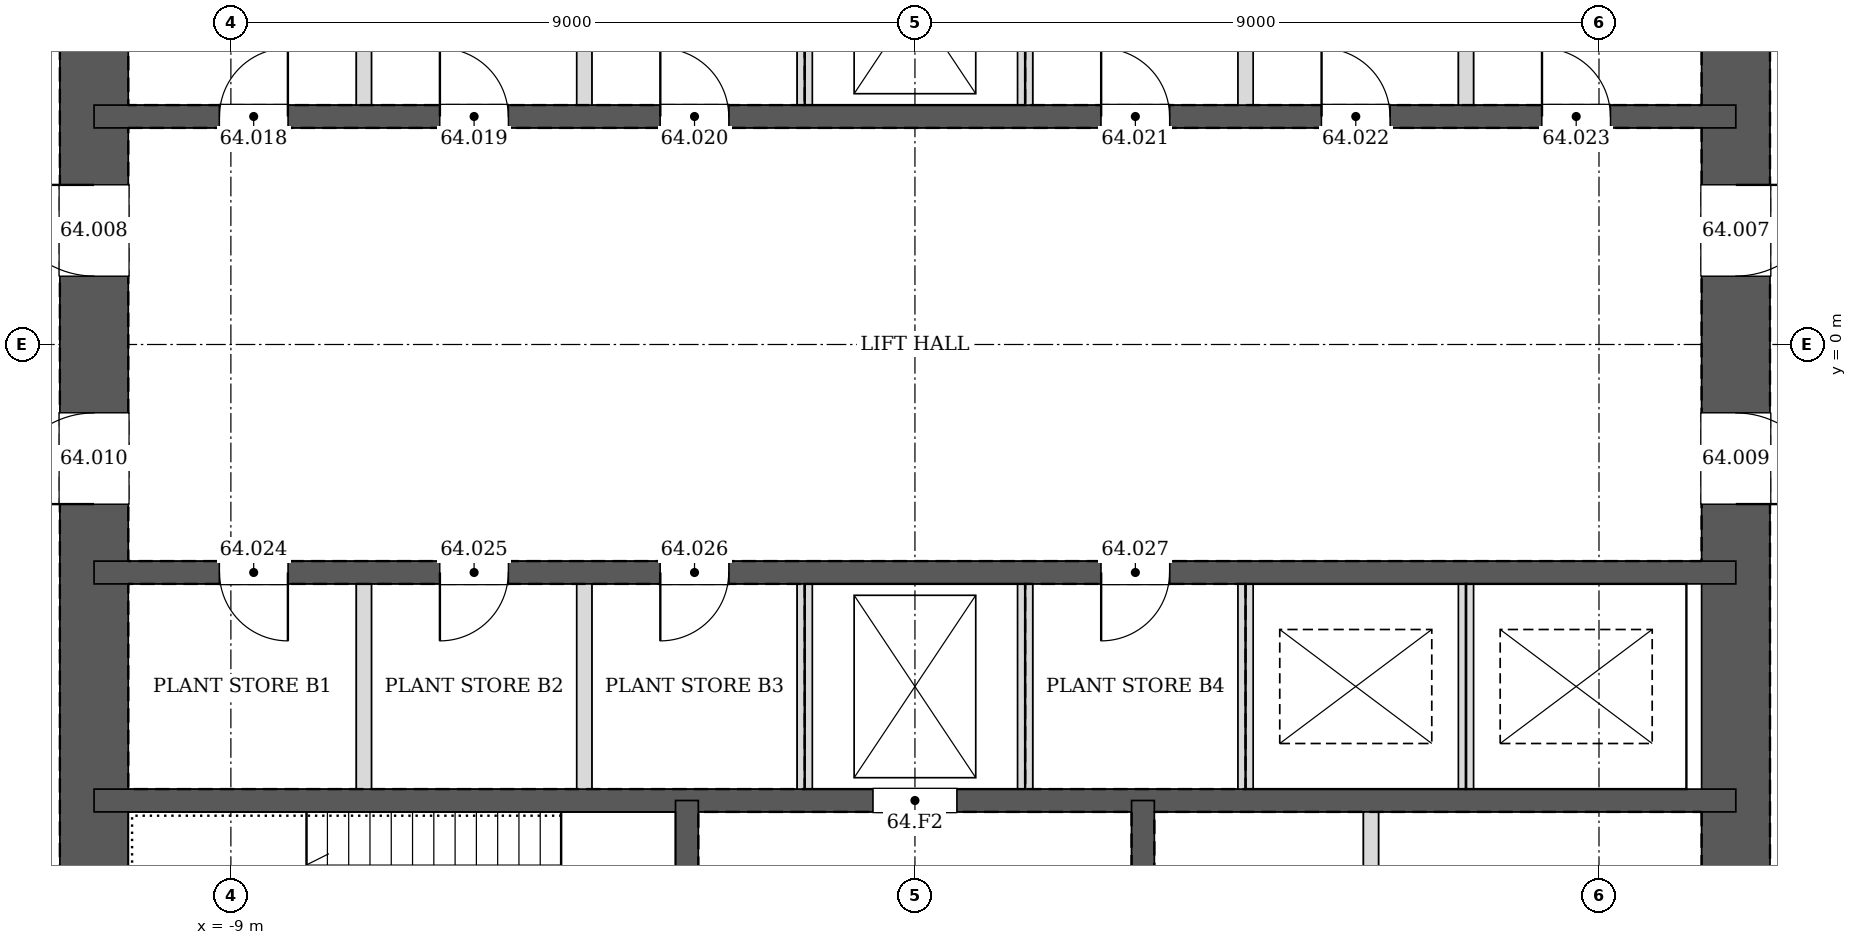
"""IFC4 building model, lengths in metres.
Left out: names, types, materials, properties, quantities, classifications, styles, units other than length and angle.
Written with IfcOpenShell. Run it as: python <this file> out.ifc"""

import sys

from ifc_helpers import new_model, si_unit, direction, frame, frame_2d, origin, place, context, subcontext, project, spatial, rectangle, extrude, element, fill, save


model = new_model("IFC4")
c1 = context("Model", 3, precision=1e-05, world=origin(), true_north=direction((0.0, 1.0)))
c2 = subcontext(c1, "Body", "Model", "MODEL_VIEW")
j1 = project(units=[si_unit("LENGTHUNIT", "METRE"), si_unit("PLANEANGLEUNIT", "RADIAN")], contexts=[c1])
p1 = place(None, origin())
s1 = spatial("IfcSite", under=j1, at=p1, CompositionType="ELEMENT")
p2 = place(p1, origin())
s2 = spatial("IfcBuilding", under=s1, at=p2, CompositionType="ELEMENT")
p3 = place(p2, frame((0.0, 0.0, 266.3)))
s3 = spatial("IfcBuildingStorey", under=s2, at=p3, CompositionType="ELEMENT", Elevation=266.3)
p4 = place(p3, frame((10.8, -10.8, 0.0), z_axis=(0.0, 0.0, 1.0), x_axis=(0.0, 1.0, 0.0)))
e1 = element("IfcWall", 1, at=p4, inside=s3, PredefinedType="SOLIDWALL", context=c2, shape_type="SweptSolid", body=[
    extrude(rectangle(XDim=21.6, YDim=0.9, at=frame_2d((10.8, 0.0))), origin(), (0.0, 0.0, 1.0), 4.5),
])
p5 = place(p4, frame((11.7, 0.0, 0.0)))
e2 = element("IfcOpeningElement", 2, at=p5, cuts=e1, PredefinedType="OPENING", context=c2, shape_type="SweptSolid", body=[
    extrude(rectangle(XDim=1.2, YDim=2.1, at=frame_2d((0.6, 1.05))), frame((0.0, 0.46, 0.0), z_axis=(0.0, -1.0, 0.0), x_axis=(1.0, 0.0, 0.0)), (0.0, 0.0, 1.0), 0.92),
])
p6 = place(p4, frame((8.7, 0.0, 0.0)))
e3 = element("IfcOpeningElement", 3, at=p6, cuts=e1, PredefinedType="OPENING", context=c2, shape_type="SweptSolid", body=[
    extrude(rectangle(XDim=1.2, YDim=2.1, at=frame_2d((0.6, 1.05))), frame((0.0, 0.46, 0.0), z_axis=(0.0, -1.0, 0.0), x_axis=(1.0, 0.0, 0.0)), (0.0, 0.0, 1.0), 0.92),
])
p7 = place(p3, frame((-10.8, 10.8, 0.0), z_axis=(0.0, 0.0, 1.0), x_axis=(0.0, -1.0, 0.0)))
e4 = element("IfcWall", 4, at=p7, inside=s3, PredefinedType="SOLIDWALL", context=c2, shape_type="SweptSolid", body=[
    extrude(rectangle(XDim=21.6, YDim=0.9, at=frame_2d((10.8, 0.0))), origin(), (0.0, 0.0, 1.0), 4.5),
])
p8 = place(p7, frame((8.7, 0.0, 0.0)))
e5 = element("IfcOpeningElement", 5, at=p8, cuts=e4, PredefinedType="OPENING", context=c2, shape_type="SweptSolid", body=[
    extrude(rectangle(XDim=1.2, YDim=2.1, at=frame_2d((0.6, 1.05))), frame((0.0, 0.46, 0.0), z_axis=(0.0, -1.0, 0.0), x_axis=(1.0, 0.0, 0.0)), (0.0, 0.0, 1.0), 0.92),
])
p9 = place(p7, frame((11.7, 0.0, 0.0)))
e6 = element("IfcOpeningElement", 6, at=p9, cuts=e4, PredefinedType="OPENING", context=c2, shape_type="SweptSolid", body=[
    extrude(rectangle(XDim=1.2, YDim=2.1, at=frame_2d((0.6, 1.05))), frame((0.0, 0.46, 0.0), z_axis=(0.0, -1.0, 0.0), x_axis=(1.0, 0.0, 0.0)), (0.0, 0.0, 1.0), 0.92),
])
p10 = place(p3, frame((-10.8, 3.0, 0.0), z_axis=(0.0, 0.0, 1.0), x_axis=(1.0, 0.0, 0.0)))
e7 = element("IfcWall", 7, at=p10, inside=s3, PredefinedType="SOLIDWALL", context=c2, shape_type="SweptSolid", body=[
    extrude(rectangle(XDim=21.6, YDim=0.3, at=frame_2d((10.8, 0.0))), origin(), (0.0, 0.0, 1.0), 4.5),
])
p11 = place(p10, frame((1.65, 0.0, 0.0)))
e8 = element("IfcOpeningElement", 8, at=p11, cuts=e7, PredefinedType="OPENING", context=c2, shape_type="SweptSolid", body=[
    extrude(rectangle(XDim=0.9, YDim=2.1, at=frame_2d((0.45, 1.05))), frame((0.0, 0.16, 0.0), z_axis=(0.0, -1.0, 0.0), x_axis=(1.0, 0.0, 0.0)), (0.0, 0.0, 1.0), 0.32),
])
p12 = place(p10, frame((4.55, 0.0, 0.0)))
e9 = element("IfcOpeningElement", 9, at=p12, cuts=e7, PredefinedType="OPENING", context=c2, shape_type="SweptSolid", body=[
    extrude(rectangle(XDim=0.9, YDim=2.1, at=frame_2d((0.45, 1.05))), frame((0.0, 0.16, 0.0), z_axis=(0.0, -1.0, 0.0), x_axis=(1.0, 0.0, 0.0)), (0.0, 0.0, 1.0), 0.32),
])
p13 = place(p10, frame((7.45, 0.0, 0.0)))
e10 = element("IfcOpeningElement", 10, at=p13, cuts=e7, PredefinedType="OPENING", context=c2, shape_type="SweptSolid", body=[
    extrude(rectangle(XDim=0.9, YDim=2.1, at=frame_2d((0.45, 1.05))), frame((0.0, 0.16, 0.0), z_axis=(0.0, -1.0, 0.0), x_axis=(1.0, 0.0, 0.0)), (0.0, 0.0, 1.0), 0.32),
])
p14 = place(p10, frame((13.25, 0.0, 0.0)))
e11 = element("IfcOpeningElement", 11, at=p14, cuts=e7, PredefinedType="OPENING", context=c2, shape_type="SweptSolid", body=[
    extrude(rectangle(XDim=0.9, YDim=2.1, at=frame_2d((0.45, 1.05))), frame((0.0, 0.16, 0.0), z_axis=(0.0, -1.0, 0.0), x_axis=(1.0, 0.0, 0.0)), (0.0, 0.0, 1.0), 0.32),
])
p15 = place(p10, frame((16.15, 0.0, 0.0)))
e12 = element("IfcOpeningElement", 12, at=p15, cuts=e7, PredefinedType="OPENING", context=c2, shape_type="SweptSolid", body=[
    extrude(rectangle(XDim=0.9, YDim=2.1, at=frame_2d((0.45, 1.05))), frame((0.0, 0.16, 0.0), z_axis=(0.0, -1.0, 0.0), x_axis=(1.0, 0.0, 0.0)), (0.0, 0.0, 1.0), 0.32),
])
p16 = place(p10, frame((19.05, 0.0, 0.0)))
e13 = element("IfcOpeningElement", 13, at=p16, cuts=e7, PredefinedType="OPENING", context=c2, shape_type="SweptSolid", body=[
    extrude(rectangle(XDim=0.9, YDim=2.1, at=frame_2d((0.45, 1.05))), frame((0.0, 0.16, 0.0), z_axis=(0.0, -1.0, 0.0), x_axis=(1.0, 0.0, 0.0)), (0.0, 0.0, 1.0), 0.32),
])
p17 = place(p3, frame((-10.8, -3.0, 0.0), z_axis=(0.0, 0.0, 1.0), x_axis=(1.0, 0.0, 0.0)))
e14 = element("IfcWall", 14, at=p17, inside=s3, PredefinedType="SOLIDWALL", context=c2, shape_type="SweptSolid", body=[
    extrude(rectangle(XDim=21.6, YDim=0.3, at=frame_2d((10.8, 0.0))), origin(), (0.0, 0.0, 1.0), 4.5),
])
p18 = place(p17, frame((1.65, 0.0, 0.0)))
e15 = element("IfcOpeningElement", 15, at=p18, cuts=e14, PredefinedType="OPENING", context=c2, shape_type="SweptSolid", body=[
    extrude(rectangle(XDim=0.9, YDim=2.1, at=frame_2d((0.45, 1.05))), frame((0.0, 0.16, 0.0), z_axis=(0.0, -1.0, 0.0), x_axis=(1.0, 0.0, 0.0)), (0.0, 0.0, 1.0), 0.32),
])
p19 = place(p17, frame((4.55, 0.0, 0.0)))
e16 = element("IfcOpeningElement", 16, at=p19, cuts=e14, PredefinedType="OPENING", context=c2, shape_type="SweptSolid", body=[
    extrude(rectangle(XDim=0.9, YDim=2.1, at=frame_2d((0.45, 1.05))), frame((0.0, 0.16, 0.0), z_axis=(0.0, -1.0, 0.0), x_axis=(1.0, 0.0, 0.0)), (0.0, 0.0, 1.0), 0.32),
])
p20 = place(p17, frame((7.45, 0.0, 0.0)))
e17 = element("IfcOpeningElement", 17, at=p20, cuts=e14, PredefinedType="OPENING", context=c2, shape_type="SweptSolid", body=[
    extrude(rectangle(XDim=0.9, YDim=2.1, at=frame_2d((0.45, 1.05))), frame((0.0, 0.16, 0.0), z_axis=(0.0, -1.0, 0.0), x_axis=(1.0, 0.0, 0.0)), (0.0, 0.0, 1.0), 0.32),
])
p21 = place(p17, frame((13.25, 0.0, 0.0)))
e18 = element("IfcOpeningElement", 18, at=p21, cuts=e14, PredefinedType="OPENING", context=c2, shape_type="SweptSolid", body=[
    extrude(rectangle(XDim=0.9, YDim=2.1, at=frame_2d((0.45, 1.05))), frame((0.0, 0.16, 0.0), z_axis=(0.0, -1.0, 0.0), x_axis=(1.0, 0.0, 0.0)), (0.0, 0.0, 1.0), 0.32),
])
p22 = place(p3, frame((-10.8, -6.0, 0.0), z_axis=(0.0, 0.0, 1.0), x_axis=(1.0, 0.0, 0.0)))
e19 = element("IfcWall", 19, at=p22, inside=s3, PredefinedType="SOLIDWALL", context=c2, shape_type="SweptSolid", body=[
    extrude(rectangle(XDim=21.6, YDim=0.3, at=frame_2d((10.8, 0.0))), origin(), (0.0, 0.0, 1.0), 4.5),
])
p23 = place(p22, frame((10.25, 0.0, 0.0)))
e20 = element("IfcOpeningElement", 20, at=p23, cuts=e19, PredefinedType="OPENING", context=c2, shape_type="SweptSolid", body=[
    extrude(rectangle(XDim=1.1, YDim=2.1, at=frame_2d((0.55, 1.05))), frame((0.0, 0.16, 0.0), z_axis=(0.0, -1.0, 0.0), x_axis=(1.0, 0.0, 0.0)), (0.0, 0.0, 1.0), 0.32),
])
p24 = place(p3, frame((-3.0, -6.0, 0.0), z_axis=(0.0, 0.0, 1.0), x_axis=(0.0, -1.0, 0.0)))
e21 = element("IfcWall", 21, at=p24, inside=s3, PredefinedType="SOLIDWALL", context=c2, shape_type="SweptSolid", body=[
    extrude(rectangle(XDim=4.8, YDim=0.3, at=frame_2d((2.4, 0.0))), origin(), (0.0, 0.0, 1.0), 4.5),
])
p25 = place(p24, frame((1.75, 0.0, 0.0)))
e22 = element("IfcOpeningElement", 22, at=p25, cuts=e21, PredefinedType="OPENING", context=c2, shape_type="SweptSolid", body=[
    extrude(rectangle(XDim=1.0, YDim=2.1, at=frame_2d((0.5, 1.05))), frame((0.0, 0.16, 0.0), z_axis=(0.0, -1.0, 0.0), x_axis=(1.0, 0.0, 0.0)), (0.0, 0.0, 1.0), 0.32),
])
p26 = place(p3, frame((3.0, -6.0, 0.0), z_axis=(0.0, 0.0, 1.0), x_axis=(0.0, -1.0, 0.0)))
e23 = element("IfcWall", 23, at=p26, inside=s3, PredefinedType="SOLIDWALL", context=c2, shape_type="SweptSolid", body=[
    extrude(rectangle(XDim=4.8, YDim=0.3, at=frame_2d((2.4, 0.0))), origin(), (0.0, 0.0, 1.0), 4.5),
])
for number, where, z_axis, x_axis in (
    (24, (-7.25, 3.15, 0.0), (0.0, 0.0, 1.0), (0.0, 1.0, 0.0)),
    (25, (-4.35, 3.15, 0.0), (0.0, 0.0, 1.0), (0.0, 1.0, 0.0)),
    (26, (-1.45, 3.15, 0.0), (0.0, 0.0, 1.0), (0.0, 1.0, 0.0)),
    (27, (1.45, 3.15, 0.0), (0.0, 0.0, 1.0), (0.0, 1.0, 0.0)),
    (28, (4.35, 3.15, 0.0), (0.0, 0.0, 1.0), (0.0, 1.0, 0.0)),
    (29, (7.25, 3.15, 0.0), (0.0, 0.0, 1.0), (0.0, 1.0, 0.0)),
    (30, (-7.25, -5.85, 0.0), (0.0, 0.0, 1.0), (0.0, 1.0, 0.0)),
    (31, (-4.35, -5.85, 0.0), (0.0, 0.0, 1.0), (0.0, 1.0, 0.0)),
    (32, (-1.45, -5.85, 0.0), (0.0, 0.0, 1.0), (0.0, 1.0, 0.0)),
    (33, (1.45, -5.85, 0.0), (0.0, 0.0, 1.0), (0.0, 1.0, 0.0)),
    (34, (4.35, -5.85, 0.0), (0.0, 0.0, 1.0), (0.0, 1.0, 0.0)),
):
    element("IfcWall", number, at=place(p3, frame(where, z_axis=z_axis, x_axis=x_axis)), inside=s3, PredefinedType="PARTITIONING", context=c2, shape_type="SweptSolid", body=[
        extrude(rectangle(XDim=2.7, YDim=0.2, at=frame_2d((1.35, 0.0))), origin(), (0.0, 0.0, 1.0), 4.3),
    ])
p27 = place(p3, frame((7.25, -5.85, 0.0), z_axis=(0.0, 0.0, 1.0), x_axis=(0.0, 1.0, 0.0)))
e35 = element("IfcWall", 35, at=p27, inside=s3, PredefinedType="PARTITIONING", context=c2, shape_type="SweptSolid", body=[
    extrude(rectangle(XDim=2.7, YDim=0.2, at=frame_2d((1.35, 0.0))), origin(), (0.0, 0.0, 1.0), 4.5),
])
p28 = place(p3, frame((6.0, -10.35, 0.0), z_axis=(0.0, 0.0, 1.0), x_axis=(0.0, 1.0, 0.0)))
e36 = element("IfcWall", 36, at=p28, inside=s3, PredefinedType="PARTITIONING", context=c2, shape_type="SweptSolid", body=[
    extrude(rectangle(XDim=4.2, YDim=0.2, at=frame_2d((2.1, 0.0))), origin(), (0.0, 0.0, 1.0), 4.3),
])
p29 = place(p28, frame((0.3, 0.0, 0.0)))
e37 = element("IfcOpeningElement", 37, at=p29, cuts=e36, PredefinedType="OPENING", context=c2, shape_type="SweptSolid", body=[
    extrude(rectangle(XDim=0.9, YDim=2.1, at=frame_2d((0.45, 1.05))), frame((0.0, 0.11, 0.0), z_axis=(0.0, -1.0, 0.0), x_axis=(1.0, 0.0, 0.0)), (0.0, 0.0, 1.0), 0.22),
])
p30 = place(p5, frame((1.2, 0.0, 0.0), z_axis=(0.0, 0.0, 1.0), x_axis=(-1.0, 0.0, 0.0)))
e38 = element("IfcDoor", 38, at=p30, inside=s3, OperationType="SINGLE_SWING_LEFT", PredefinedType="DOOR", context=c2, shape_type="SweptSolid", body=[
    extrude(rectangle(XDim=1.2, YDim=2.1, at=frame_2d((0.6, 1.05))), frame((0.0, 0.025, 0.0), z_axis=(0.0, -1.0, 0.0), x_axis=(1.0, 0.0, 0.0)), (0.0, 0.0, 1.0), 0.05),
])
fill(e2, e38)
p31 = place(p8, frame((1.2, 0.0, 0.0), z_axis=(0.0, 0.0, 1.0), x_axis=(-1.0, 0.0, 0.0)))
e39 = element("IfcDoor", 39, at=p31, inside=s3, OperationType="SINGLE_SWING_RIGHT", PredefinedType="DOOR", context=c2, shape_type="SweptSolid", body=[
    extrude(rectangle(XDim=1.2, YDim=2.1, at=frame_2d((0.6, 1.05))), frame((0.0, 0.025, 0.0), z_axis=(0.0, -1.0, 0.0), x_axis=(1.0, 0.0, 0.0)), (0.0, 0.0, 1.0), 0.05),
])
fill(e5, e39)
p32 = place(p6, frame((1.2, 0.0, 0.0), z_axis=(0.0, 0.0, 1.0), x_axis=(-1.0, 0.0, 0.0)))
e40 = element("IfcDoor", 40, at=p32, inside=s3, OperationType="SINGLE_SWING_RIGHT", PredefinedType="DOOR", context=c2, shape_type="SweptSolid", body=[
    extrude(rectangle(XDim=1.2, YDim=2.1, at=frame_2d((0.6, 1.05))), frame((0.0, 0.025, 0.0), z_axis=(0.0, -1.0, 0.0), x_axis=(1.0, 0.0, 0.0)), (0.0, 0.0, 1.0), 0.05),
])
fill(e3, e40)
p33 = place(p9, frame((1.2, 0.0, 0.0), z_axis=(0.0, 0.0, 1.0), x_axis=(-1.0, 0.0, 0.0)))
e41 = element("IfcDoor", 41, at=p33, inside=s3, OperationType="SINGLE_SWING_LEFT", PredefinedType="DOOR", context=c2, shape_type="SweptSolid", body=[
    extrude(rectangle(XDim=1.2, YDim=2.1, at=frame_2d((0.6, 1.05))), frame((0.0, 0.025, 0.0), z_axis=(0.0, -1.0, 0.0), x_axis=(1.0, 0.0, 0.0)), (0.0, 0.0, 1.0), 0.05),
])
fill(e6, e41)
p34 = place(p11, origin())
e42 = element("IfcDoor", 42, at=p34, inside=s3, OperationType="SINGLE_SWING_RIGHT", PredefinedType="DOOR", context=c2, shape_type="SweptSolid", body=[
    extrude(rectangle(XDim=0.9, YDim=2.1, at=frame_2d((0.45, 1.05))), frame((0.0, 0.025, 0.0), z_axis=(0.0, -1.0, 0.0), x_axis=(1.0, 0.0, 0.0)), (0.0, 0.0, 1.0), 0.05),
])
fill(e8, e42)
p35 = place(p12, origin())
e43 = element("IfcDoor", 43, at=p35, inside=s3, OperationType="SINGLE_SWING_LEFT", PredefinedType="DOOR", context=c2, shape_type="SweptSolid", body=[
    extrude(rectangle(XDim=0.9, YDim=2.1, at=frame_2d((0.45, 1.05))), frame((0.0, 0.025, 0.0), z_axis=(0.0, -1.0, 0.0), x_axis=(1.0, 0.0, 0.0)), (0.0, 0.0, 1.0), 0.05),
])
fill(e9, e43)
p36 = place(p13, origin())
e44 = element("IfcDoor", 44, at=p36, inside=s3, OperationType="SINGLE_SWING_LEFT", PredefinedType="DOOR", context=c2, shape_type="SweptSolid", body=[
    extrude(rectangle(XDim=0.9, YDim=2.1, at=frame_2d((0.45, 1.05))), frame((0.0, 0.025, 0.0), z_axis=(0.0, -1.0, 0.0), x_axis=(1.0, 0.0, 0.0)), (0.0, 0.0, 1.0), 0.05),
])
fill(e10, e44)
p37 = place(p14, origin())
e45 = element("IfcDoor", 45, at=p37, inside=s3, OperationType="SINGLE_SWING_LEFT", PredefinedType="DOOR", context=c2, shape_type="SweptSolid", body=[
    extrude(rectangle(XDim=0.9, YDim=2.1, at=frame_2d((0.45, 1.05))), frame((0.0, 0.025, 0.0), z_axis=(0.0, -1.0, 0.0), x_axis=(1.0, 0.0, 0.0)), (0.0, 0.0, 1.0), 0.05),
])
fill(e11, e45)
p38 = place(p15, origin())
e46 = element("IfcDoor", 46, at=p38, inside=s3, OperationType="SINGLE_SWING_LEFT", PredefinedType="DOOR", context=c2, shape_type="SweptSolid", body=[
    extrude(rectangle(XDim=0.9, YDim=2.1, at=frame_2d((0.45, 1.05))), frame((0.0, 0.025, 0.0), z_axis=(0.0, -1.0, 0.0), x_axis=(1.0, 0.0, 0.0)), (0.0, 0.0, 1.0), 0.05),
])
fill(e12, e46)
p39 = place(p16, origin())
e47 = element("IfcDoor", 47, at=p39, inside=s3, OperationType="SINGLE_SWING_LEFT", PredefinedType="DOOR", context=c2, shape_type="SweptSolid", body=[
    extrude(rectangle(XDim=0.9, YDim=2.1, at=frame_2d((0.45, 1.05))), frame((0.0, 0.025, 0.0), z_axis=(0.0, -1.0, 0.0), x_axis=(1.0, 0.0, 0.0)), (0.0, 0.0, 1.0), 0.05),
])
fill(e13, e47)
p40 = place(p18, frame((0.9, 0.0, 0.0), z_axis=(0.0, 0.0, 1.0), x_axis=(-1.0, 0.0, 0.0)))
e48 = element("IfcDoor", 48, at=p40, inside=s3, OperationType="SINGLE_SWING_LEFT", PredefinedType="DOOR", context=c2, shape_type="SweptSolid", body=[
    extrude(rectangle(XDim=0.9, YDim=2.1, at=frame_2d((0.45, 1.05))), frame((0.0, 0.025, 0.0), z_axis=(0.0, -1.0, 0.0), x_axis=(1.0, 0.0, 0.0)), (0.0, 0.0, 1.0), 0.05),
])
fill(e15, e48)
p41 = place(p19, frame((0.9, 0.0, 0.0), z_axis=(0.0, 0.0, 1.0), x_axis=(-1.0, 0.0, 0.0)))
e49 = element("IfcDoor", 49, at=p41, inside=s3, OperationType="SINGLE_SWING_RIGHT", PredefinedType="DOOR", context=c2, shape_type="SweptSolid", body=[
    extrude(rectangle(XDim=0.9, YDim=2.1, at=frame_2d((0.45, 1.05))), frame((0.0, 0.025, 0.0), z_axis=(0.0, -1.0, 0.0), x_axis=(1.0, 0.0, 0.0)), (0.0, 0.0, 1.0), 0.05),
])
fill(e16, e49)
p42 = place(p20, frame((0.9, 0.0, 0.0), z_axis=(0.0, 0.0, 1.0), x_axis=(-1.0, 0.0, 0.0)))
e50 = element("IfcDoor", 50, at=p42, inside=s3, OperationType="SINGLE_SWING_RIGHT", PredefinedType="DOOR", context=c2, shape_type="SweptSolid", body=[
    extrude(rectangle(XDim=0.9, YDim=2.1, at=frame_2d((0.45, 1.05))), frame((0.0, 0.025, 0.0), z_axis=(0.0, -1.0, 0.0), x_axis=(1.0, 0.0, 0.0)), (0.0, 0.0, 1.0), 0.05),
])
fill(e17, e50)
p43 = place(p21, frame((0.9, 0.0, 0.0), z_axis=(0.0, 0.0, 1.0), x_axis=(-1.0, 0.0, 0.0)))
e51 = element("IfcDoor", 51, at=p43, inside=s3, OperationType="SINGLE_SWING_RIGHT", PredefinedType="DOOR", context=c2, shape_type="SweptSolid", body=[
    extrude(rectangle(XDim=0.9, YDim=2.1, at=frame_2d((0.45, 1.05))), frame((0.0, 0.025, 0.0), z_axis=(0.0, -1.0, 0.0), x_axis=(1.0, 0.0, 0.0)), (0.0, 0.0, 1.0), 0.05),
])
fill(e18, e51)
p44 = place(p23, origin())
e52 = element("IfcDoor", 52, at=p44, inside=s3, OperationType="DOUBLE_DOOR_SLIDING", PredefinedType="DOOR", context=c2, shape_type="SweptSolid", body=[
    extrude(rectangle(XDim=1.1, YDim=2.1, at=frame_2d((0.55, 1.05))), frame((0.0, 0.025, 0.0), z_axis=(0.0, -1.0, 0.0), x_axis=(1.0, 0.0, 0.0)), (0.0, 0.0, 1.0), 0.05),
])
fill(e20, e52)
save(model, sys.argv[1])
